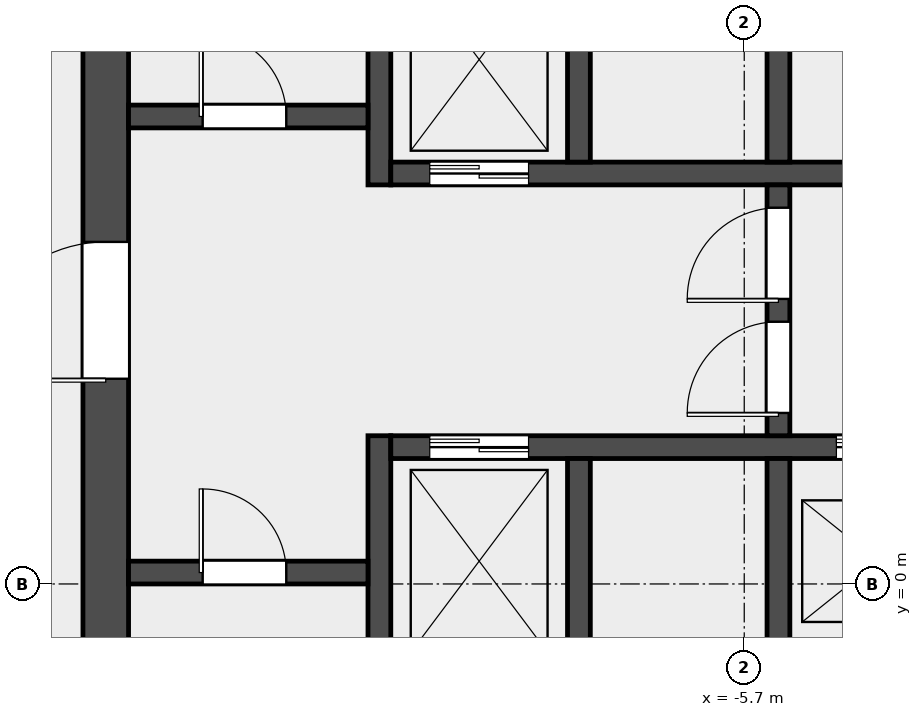
"""IFC4 building model, lengths in metres.
Left out: names, types, materials, properties, quantities, classifications, styles, units other than length and angle.
Written with IfcOpenShell. Run it as: python <this file> out.ifc"""

import sys

from ifc_helpers import new_model, si_unit, direction, frame, frame_2d, origin, place, context, subcontext, project, spatial, rectangle, extrude, element, fill, save


model = new_model("IFC4")
c1 = context("Model", 3, precision=1e-05, world=origin(), true_north=direction((0.0, 1.0)))
c2 = subcontext(c1, "Body", "Model", "MODEL_VIEW")
j1 = project(units=[si_unit("LENGTHUNIT", "METRE"), si_unit("PLANEANGLEUNIT", "RADIAN")], contexts=[c1])
p1 = place(None, origin())
s1 = spatial("IfcSite", under=j1, at=p1, CompositionType="ELEMENT")
p2 = place(p1, origin())
s2 = spatial("IfcBuilding", under=s1, at=p2, CompositionType="ELEMENT")
p3 = place(p2, frame((0.0, 0.0, 135.1)))
s3 = spatial("IfcBuildingStorey", under=s2, at=p3, CompositionType="ELEMENT", Elevation=135.1)
p4 = place(p3, frame((-14.1, -6.6, 0.0), z_axis=(0.0, 0.0, 1.0), x_axis=(0.0, 1.0, 0.0)))
e1 = element("IfcWall", 1, at=p4, inside=s3, PredefinedType="SHEAR", context=c2, shape_type="SweptSolid", body=[
    extrude(rectangle(XDim=19.5, YDim=0.6, at=frame_2d((9.75, 0.0))), origin(), (0.0, 0.0, 1.0), 4.2),
])
p5 = place(p4, frame((9.3, 0.0, 0.0)))
e2 = element("IfcOpeningElement", 2, at=p5, cuts=e1, PredefinedType="OPENING", context=c2, shape_type="SweptSolid", body=[
    extrude(rectangle(XDim=1.8, YDim=2.1, at=frame_2d((0.9, 1.05))), frame((0.0, 0.312, 0.0), z_axis=(0.0, -1.0, 0.0), x_axis=(1.0, 0.0, 0.0)), (0.0, 0.0, 1.0), 0.624),
])
p6 = place(p3, frame((-10.5, -6.6, 0.0), z_axis=(0.0, 0.0, 1.0), x_axis=(0.0, 1.0, 0.0)))
e3 = element("IfcWall", 3, at=p6, inside=s3, PredefinedType="SHEAR", context=c2, shape_type="SweptSolid", body=[
    extrude(rectangle(XDim=8.55, YDim=0.3, at=frame_2d((4.275, 0.0))), origin(), (0.0, 0.0, 1.0), 4.2),
])
p7 = place(p3, frame((-10.5, 5.25, 0.0), z_axis=(0.0, 0.0, 1.0), x_axis=(0.0, 1.0, 0.0)))
e4 = element("IfcWall", 4, at=p7, inside=s3, PredefinedType="SHEAR", context=c2, shape_type="SweptSolid", body=[
    extrude(rectangle(XDim=7.65, YDim=0.3, at=frame_2d((3.825, 0.0))), origin(), (0.0, 0.0, 1.0), 4.2),
])
p8 = place(p3, frame((-13.8, 0.15, 0.0), z_axis=(0.0, 0.0, 1.0), x_axis=(1.0, 0.0, 0.0)))
e5 = element("IfcWall", 5, at=p8, inside=s3, PredefinedType="SOLIDWALL", context=c2, shape_type="SweptSolid", body=[
    extrude(rectangle(XDim=3.15, YDim=0.3, at=frame_2d((1.575, 0.0))), origin(), (0.0, 0.0, 1.0), 4.2),
])
p9 = place(p8, frame((0.975, 0.0, 0.0)))
e6 = element("IfcOpeningElement", 6, at=p9, cuts=e5, PredefinedType="OPENING", context=c2, shape_type="SweptSolid", body=[
    extrude(rectangle(XDim=1.1, YDim=2.1, at=frame_2d((0.55, 1.05))), frame((0.0, 0.162, 0.0), z_axis=(0.0, -1.0, 0.0), x_axis=(1.0, 0.0, 0.0)), (0.0, 0.0, 1.0), 0.324),
])
p10 = place(p3, frame((-13.8, 6.15, 0.0), z_axis=(0.0, 0.0, 1.0), x_axis=(1.0, 0.0, 0.0)))
e7 = element("IfcWall", 7, at=p10, inside=s3, PredefinedType="SOLIDWALL", context=c2, shape_type="SweptSolid", body=[
    extrude(rectangle(XDim=3.15, YDim=0.3, at=frame_2d((1.575, 0.0))), origin(), (0.0, 0.0, 1.0), 4.2),
])
p11 = place(p10, frame((0.975, 0.0, 0.0)))
e8 = element("IfcOpeningElement", 8, at=p11, cuts=e7, PredefinedType="OPENING", context=c2, shape_type="SweptSolid", body=[
    extrude(rectangle(XDim=1.1, YDim=2.1, at=frame_2d((0.55, 1.05))), frame((0.0, 0.162, 0.0), z_axis=(0.0, -1.0, 0.0), x_axis=(1.0, 0.0, 0.0)), (0.0, 0.0, 1.0), 0.324),
])
p12 = place(p3, frame((-10.35, 1.8, 0.0), z_axis=(0.0, 0.0, 1.0), x_axis=(1.0, 0.0, 0.0)))
e9 = element("IfcWall", 9, at=p12, inside=s3, PredefinedType="SOLIDWALL", context=c2, shape_type="SweptSolid", body=[
    extrude(rectangle(XDim=20.7, YDim=0.3, at=frame_2d((10.35, 0.0))), origin(), (0.0, 0.0, 1.0), 4.2),
])
p13 = place(p12, frame((0.512, 0.0, 0.0)))
e10 = element("IfcOpeningElement", 10, at=p13, cuts=e9, PredefinedType="OPENING", context=c2, shape_type="SweptSolid", body=[
    extrude(rectangle(XDim=1.3, YDim=2.1, at=frame_2d((0.65, 1.05))), frame((0.0, 0.162, 0.0), z_axis=(0.0, -1.0, 0.0), x_axis=(1.0, 0.0, 0.0)), (0.0, 0.0, 1.0), 0.324),
])
p14 = place(p12, frame((5.863, 0.0, 0.0)))
e11 = element("IfcOpeningElement", 11, at=p14, cuts=e9, PredefinedType="OPENING", context=c2, shape_type="SweptSolid", body=[
    extrude(rectangle(XDim=1.1, YDim=2.1, at=frame_2d((0.55, 1.05))), frame((0.0, 0.162, 0.0), z_axis=(0.0, -1.0, 0.0), x_axis=(1.0, 0.0, 0.0)), (0.0, 0.0, 1.0), 0.324),
])
p15 = place(p12, frame((8.488, 0.0, 0.0)))
e12 = element("IfcOpeningElement", 12, at=p15, cuts=e9, PredefinedType="OPENING", context=c2, shape_type="SweptSolid", body=[
    extrude(rectangle(XDim=1.1, YDim=2.1, at=frame_2d((0.55, 1.05))), frame((0.0, 0.162, 0.0), z_axis=(0.0, -1.0, 0.0), x_axis=(1.0, 0.0, 0.0)), (0.0, 0.0, 1.0), 0.324),
])
p16 = place(p12, frame((11.113, 0.0, 0.0)))
e13 = element("IfcOpeningElement", 13, at=p16, cuts=e9, PredefinedType="OPENING", context=c2, shape_type="SweptSolid", body=[
    extrude(rectangle(XDim=1.1, YDim=2.1, at=frame_2d((0.55, 1.05))), frame((0.0, 0.162, 0.0), z_axis=(0.0, -1.0, 0.0), x_axis=(1.0, 0.0, 0.0)), (0.0, 0.0, 1.0), 0.324),
])
p17 = place(p12, frame((13.738, 0.0, 0.0)))
e14 = element("IfcOpeningElement", 14, at=p17, cuts=e9, PredefinedType="OPENING", context=c2, shape_type="SweptSolid", body=[
    extrude(rectangle(XDim=1.1, YDim=2.1, at=frame_2d((0.55, 1.05))), frame((0.0, 0.162, 0.0), z_axis=(0.0, -1.0, 0.0), x_axis=(1.0, 0.0, 0.0)), (0.0, 0.0, 1.0), 0.324),
])
p18 = place(p12, frame((16.363, 0.0, 0.0)))
e15 = element("IfcOpeningElement", 15, at=p18, cuts=e9, PredefinedType="OPENING", context=c2, shape_type="SweptSolid", body=[
    extrude(rectangle(XDim=1.1, YDim=2.1, at=frame_2d((0.55, 1.05))), frame((0.0, 0.162, 0.0), z_axis=(0.0, -1.0, 0.0), x_axis=(1.0, 0.0, 0.0)), (0.0, 0.0, 1.0), 0.324),
])
p19 = place(p12, frame((18.988, 0.0, 0.0)))
e16 = element("IfcOpeningElement", 16, at=p19, cuts=e9, PredefinedType="OPENING", context=c2, shape_type="SweptSolid", body=[
    extrude(rectangle(XDim=1.1, YDim=2.1, at=frame_2d((0.55, 1.05))), frame((0.0, 0.162, 0.0), z_axis=(0.0, -1.0, 0.0), x_axis=(1.0, 0.0, 0.0)), (0.0, 0.0, 1.0), 0.324),
])
p20 = place(p3, frame((-10.35, 5.4, 0.0), z_axis=(0.0, 0.0, 1.0), x_axis=(1.0, 0.0, 0.0)))
e17 = element("IfcWall", 17, at=p20, inside=s3, PredefinedType="SOLIDWALL", context=c2, shape_type="SweptSolid", body=[
    extrude(rectangle(XDim=20.7, YDim=0.3, at=frame_2d((10.35, 0.0))), origin(), (0.0, 0.0, 1.0), 4.2),
])
p21 = place(p20, frame((0.512, 0.0, 0.0)))
e18 = element("IfcOpeningElement", 18, at=p21, cuts=e17, PredefinedType="OPENING", context=c2, shape_type="SweptSolid", body=[
    extrude(rectangle(XDim=1.3, YDim=2.1, at=frame_2d((0.65, 1.05))), frame((0.0, 0.162, 0.0), z_axis=(0.0, -1.0, 0.0), x_axis=(1.0, 0.0, 0.0)), (0.0, 0.0, 1.0), 0.324),
])
for number, where, z_axis, x_axis in (
    (19, (-7.875, -1.05, 0.0), (0.0, 0.0, 1.0), (0.0, 1.0, 0.0)),
    (20, (-5.25, -1.05, 0.0), (0.0, 0.0, 1.0), (0.0, 1.0, 0.0)),
    (21, (-7.875, 5.55, 0.0), (0.0, 0.0, 1.0), (0.0, 1.0, 0.0)),
    (22, (-5.25, 5.55, 0.0), (0.0, 0.0, 1.0), (0.0, 1.0, 0.0)),
):
    element("IfcWall", number, at=place(p3, frame(where, z_axis=z_axis, x_axis=x_axis)), inside=s3, PredefinedType="SOLIDWALL", context=c2, shape_type="SweptSolid", body=[
        extrude(rectangle(XDim=2.7, YDim=0.3, at=frame_2d((1.35, 0.0))), origin(), (0.0, 0.0, 1.0), 4.2),
    ])
p22 = place(p3, frame((-5.25, 1.95, 0.0), z_axis=(0.0, 0.0, 1.0), x_axis=(0.0, 1.0, 0.0)))
e23 = element("IfcWall", 23, at=p22, inside=s3, PredefinedType="SOLIDWALL", context=c2, shape_type="SweptSolid", body=[
    extrude(rectangle(XDim=3.3, YDim=0.3, at=frame_2d((1.65, 0.0))), origin(), (0.0, 0.0, 1.0), 4.2),
])
p23 = place(p22, frame((0.3, 0.0, 0.0)))
e24 = element("IfcOpeningElement", 24, at=p23, cuts=e23, PredefinedType="OPENING", context=c2, shape_type="SweptSolid", body=[
    extrude(rectangle(XDim=1.2, YDim=2.1, at=frame_2d((0.6, 1.05))), frame((0.0, 0.162, 0.0), z_axis=(0.0, -1.0, 0.0), x_axis=(1.0, 0.0, 0.0)), (0.0, 0.0, 1.0), 0.324),
])
p24 = place(p22, frame((1.8, 0.0, 0.0)))
e25 = element("IfcOpeningElement", 25, at=p24, cuts=e23, PredefinedType="OPENING", context=c2, shape_type="SweptSolid", body=[
    extrude(rectangle(XDim=1.2, YDim=2.1, at=frame_2d((0.6, 1.05))), frame((0.0, 0.162, 0.0), z_axis=(0.0, -1.0, 0.0), x_axis=(1.0, 0.0, 0.0)), (0.0, 0.0, 1.0), 0.324),
])
p25 = place(p9, origin())
e26 = element("IfcDoor", 26, at=p25, inside=s3, OperationType="SINGLE_SWING_LEFT", PredefinedType="DOOR", context=c2, shape_type="SweptSolid", body=[
    extrude(rectangle(XDim=1.1, YDim=2.1, at=frame_2d((0.55, 1.05))), frame((0.0, 0.025, 0.0), z_axis=(0.0, -1.0, 0.0), x_axis=(1.0, 0.0, 0.0)), (0.0, 0.0, 1.0), 0.05),
])
fill(e6, e26)
p26 = place(p11, origin())
e27 = element("IfcDoor", 27, at=p26, inside=s3, OperationType="SINGLE_SWING_LEFT", PredefinedType="DOOR", context=c2, shape_type="SweptSolid", body=[
    extrude(rectangle(XDim=1.1, YDim=2.1, at=frame_2d((0.55, 1.05))), frame((0.0, 0.025, 0.0), z_axis=(0.0, -1.0, 0.0), x_axis=(1.0, 0.0, 0.0)), (0.0, 0.0, 1.0), 0.05),
])
fill(e8, e27)
p27 = place(p5, origin())
e28 = element("IfcDoor", 28, at=p27, inside=s3, OperationType="DOUBLE_DOOR_SINGLE_SWING", PredefinedType="DOOR", context=c2, shape_type="SweptSolid", body=[
    extrude(rectangle(XDim=1.8, YDim=2.1, at=frame_2d((0.9, 1.05))), frame((0.0, 0.025, 0.0), z_axis=(0.0, -1.0, 0.0), x_axis=(1.0, 0.0, 0.0)), (0.0, 0.0, 1.0), 0.05),
])
fill(e2, e28)
p28 = place(p23, origin())
e29 = element("IfcDoor", 29, at=p28, inside=s3, OperationType="SINGLE_SWING_LEFT", PredefinedType="DOOR", context=c2, shape_type="SweptSolid", body=[
    extrude(rectangle(XDim=1.2, YDim=2.1, at=frame_2d((0.6, 1.05))), frame((0.0, 0.025, 0.0), z_axis=(0.0, -1.0, 0.0), x_axis=(1.0, 0.0, 0.0)), (0.0, 0.0, 1.0), 0.05),
])
fill(e24, e29)
p29 = place(p24, origin())
e30 = element("IfcDoor", 30, at=p29, inside=s3, OperationType="SINGLE_SWING_RIGHT", PredefinedType="DOOR", context=c2, shape_type="SweptSolid", body=[
    extrude(rectangle(XDim=1.2, YDim=2.1, at=frame_2d((0.6, 1.05))), frame((0.0, 0.025, 0.0), z_axis=(0.0, -1.0, 0.0), x_axis=(1.0, 0.0, 0.0)), (0.0, 0.0, 1.0), 0.05),
])
fill(e25, e30)
p30 = place(p13, origin())
e31 = element("IfcDoor", 31, at=p30, inside=s3, OperationType="DOUBLE_DOOR_SLIDING", PredefinedType="DOOR", context=c2, shape_type="SweptSolid", body=[
    extrude(rectangle(XDim=1.3, YDim=2.1, at=frame_2d((0.65, 1.05))), frame((0.0, 0.025, 0.0), z_axis=(0.0, -1.0, 0.0), x_axis=(1.0, 0.0, 0.0)), (0.0, 0.0, 1.0), 0.05),
])
fill(e10, e31)
p31 = place(p14, origin())
e32 = element("IfcDoor", 32, at=p31, inside=s3, OperationType="DOUBLE_DOOR_SLIDING", PredefinedType="DOOR", context=c2, shape_type="SweptSolid", body=[
    extrude(rectangle(XDim=1.1, YDim=2.1, at=frame_2d((0.55, 1.05))), frame((0.0, 0.025, 0.0), z_axis=(0.0, -1.0, 0.0), x_axis=(1.0, 0.0, 0.0)), (0.0, 0.0, 1.0), 0.05),
])
fill(e11, e32)
p32 = place(p21, origin())
e33 = element("IfcDoor", 33, at=p32, inside=s3, OperationType="DOUBLE_DOOR_SLIDING", PredefinedType="DOOR", context=c2, shape_type="SweptSolid", body=[
    extrude(rectangle(XDim=1.3, YDim=2.1, at=frame_2d((0.65, 1.05))), frame((0.0, 0.025, 0.0), z_axis=(0.0, -1.0, 0.0), x_axis=(1.0, 0.0, 0.0)), (0.0, 0.0, 1.0), 0.05),
])
fill(e18, e33)
save(model, sys.argv[1])
